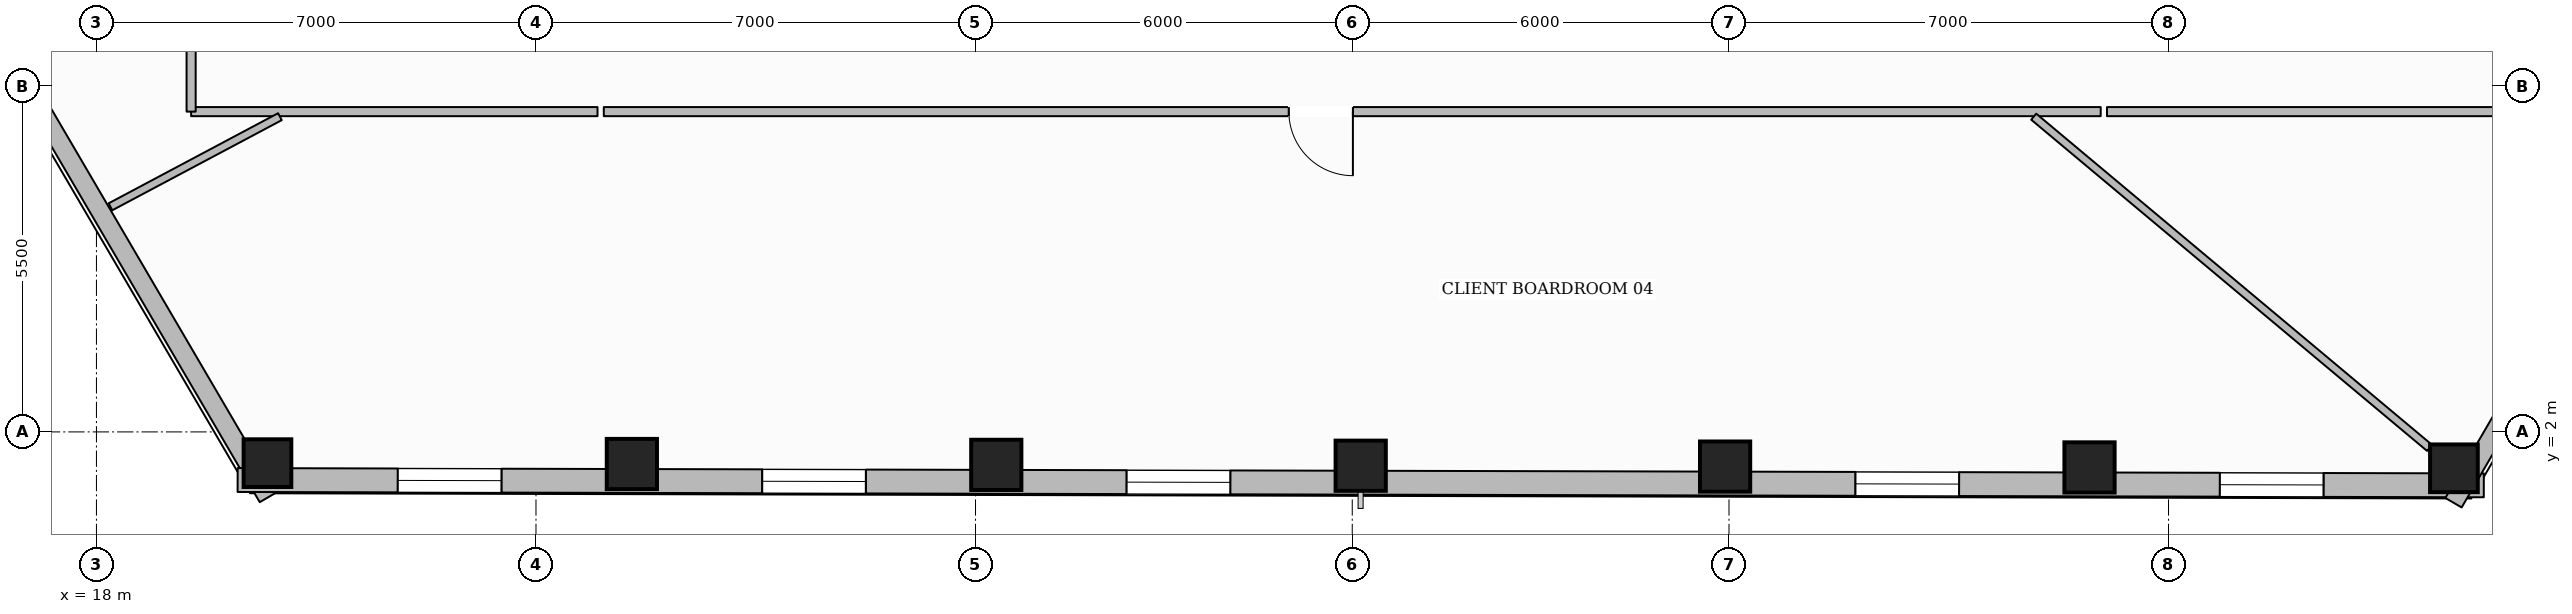
"""IFC4 building model, lengths in metres.
Left out: names, types, materials, properties, quantities, classifications, styles, units other than length and angle.
Written with IfcOpenShell. Run it as: python <this file> out.ifc"""

import sys

from ifc_helpers import new_model, si_unit, direction, frame, frame_2d, origin, origin_2d, place, context, subcontext, project, spatial, rectangle, hollow_rectangle, extrude, element, fill, save


model = new_model("IFC4")
c1 = context("Model", 3, precision=1e-05, world=origin(), true_north=direction((0.0, 1.0)))
c2 = subcontext(c1, "Body", "Model", "MODEL_VIEW")
j1 = project(units=[si_unit("LENGTHUNIT", "METRE"), si_unit("PLANEANGLEUNIT", "RADIAN")], contexts=[c1])
p1 = place(None, origin())
s1 = spatial("IfcSite", under=j1, at=p1, CompositionType="ELEMENT")
p2 = place(p1, origin())
s2 = spatial("IfcBuilding", under=s1, at=p2, CompositionType="ELEMENT")
p3 = place(p2, frame((0.0, 0.0, 56.05)))
s3 = spatial("IfcBuildingStorey", under=s2, at=p3, CompositionType="ELEMENT", Elevation=56.05)
p4 = place(p3, frame((20.723, 1.503, 0.0), z_axis=(0.0, 0.0, 1.0), x_axis=(1.0, 0.0, 0.0)))
e1 = element("IfcColumn", 1, at=p4, inside=s3, PredefinedType="COLUMN", context=c2, shape_type="SweptSolid", body=[
    extrude(hollow_rectangle(XDim=0.76, YDim=0.76, WallThickness=0.035, at=origin_2d()), origin(), (0.0, 0.0, 1.0), 3.59),
])
for number, where, z_axis, x_axis in (
    (2, (26.527, 1.489, 0.0), (0.0, 0.0, 1.0), (1.0, 0.0, 0.0)),
    (3, (32.331, 1.475, 0.0), (0.0, 0.0, 1.0), (1.0, 0.0, 0.0)),
    (4, (38.135, 1.461, 0.0), (0.0, 0.0, 1.0), (1.0, 0.0, 0.0)),
    (5, (43.938, 1.448, 0.0), (0.0, 0.0, 1.0), (1.0, 0.0, 0.0)),
    (6, (49.742, 1.434, 0.0), (0.0, 0.0, 1.0), (1.0, 0.0, 0.0)),
):
    element("IfcColumn", number, at=place(p3, frame(where, z_axis=z_axis, x_axis=x_axis)), inside=s3, PredefinedType="COLUMN", context=c2, shape_type="SweptSolid", body=[
        extrude(hollow_rectangle(XDim=0.8, YDim=0.8, WallThickness=0.036, at=origin_2d()), origin(), (0.0, 0.0, 1.0), 3.59),
    ])
p5 = place(p3, frame((55.545, 1.42, 0.0), z_axis=(0.0, 0.0, 1.0), x_axis=(1.0, 0.0, 0.0)))
e7 = element("IfcColumn", 7, at=p5, inside=s3, PredefinedType="COLUMN", context=c2, shape_type="SweptSolid", body=[
    extrude(hollow_rectangle(XDim=0.76, YDim=0.76, WallThickness=0.035, at=origin_2d()), origin(), (0.0, 0.0, 1.0), 3.59),
])
p6 = place(p3, frame((20.73, 0.957, 0.0), z_axis=(0.0, 0.0, 1.0), x_axis=(-0.5053057827, 0.86294036061, 0.0)))
e8 = element("IfcWall", 8, at=p6, inside=s3, PredefinedType="STANDARD", context=c2, shape_type="SweptSolid", body=[
    extrude(rectangle(XDim=15.556, YDim=0.3, at=frame_2d((7.778, 0.0))), origin(), (0.0, 0.0, 1.0), 2.97),
])
p7 = place(p6, frame((7.178, 0.0, 0.65)))
e9 = element("IfcOpeningElement", 9, at=p7, cuts=e8, PredefinedType="OPENING", context=c2, shape_type="SweptSolid", body=[
    extrude(rectangle(XDim=1.2, YDim=1.7, at=frame_2d((0.6, 0.85))), frame((0.0, 0.16, 0.0), z_axis=(0.0, -1.0, 0.0), x_axis=(1.0, 0.0, 0.0)), (0.0, 0.0, 1.0), 0.32),
])
p8 = place(p3, frame((56.021, 1.149, 0.0), z_axis=(0.0, 0.0, 1.0), x_axis=(-0.999997228104, 0.00235452441, 0.0)))
e10 = element("IfcWall", 10, at=p8, inside=s3, PredefinedType="STANDARD", context=c2, shape_type="SweptSolid", body=[
    extrude(rectangle(XDim=35.773, YDim=0.38, at=frame_2d((17.886, 0.0))), origin(), (0.0, 0.0, 1.0), 2.97),
])
p9 = place(p8, frame((31.572, 0.0, 0.65)))
e11 = element("IfcOpeningElement", 11, at=p9, cuts=e10, PredefinedType="OPENING", context=c2, shape_type="SweptSolid", body=[
    extrude(rectangle(XDim=1.65, YDim=1.75, at=frame_2d((0.825, 0.875))), frame((0.0, 0.2, 0.0), z_axis=(0.0, -1.0, 0.0), x_axis=(1.0, 0.0, 0.0)), (0.0, 0.0, 1.0), 0.4),
])
p10 = place(p8, frame((25.768, 0.0, 0.65)))
e12 = element("IfcOpeningElement", 12, at=p10, cuts=e10, PredefinedType="OPENING", context=c2, shape_type="SweptSolid", body=[
    extrude(rectangle(XDim=1.65, YDim=1.75, at=frame_2d((0.825, 0.875))), frame((0.0, 0.2, 0.0), z_axis=(0.0, -1.0, 0.0), x_axis=(1.0, 0.0, 0.0)), (0.0, 0.0, 1.0), 0.4),
])
p11 = place(p8, frame((19.964, 0.0, 0.65)))
e13 = element("IfcOpeningElement", 13, at=p11, cuts=e10, PredefinedType="OPENING", context=c2, shape_type="SweptSolid", body=[
    extrude(rectangle(XDim=1.65, YDim=1.75, at=frame_2d((0.825, 0.875))), frame((0.0, 0.2, 0.0), z_axis=(0.0, -1.0, 0.0), x_axis=(1.0, 0.0, 0.0)), (0.0, 0.0, 1.0), 0.4),
])
p12 = place(p8, frame((8.357, 0.0, 0.65)))
e14 = element("IfcOpeningElement", 14, at=p12, cuts=e10, PredefinedType="OPENING", context=c2, shape_type="SweptSolid", body=[
    extrude(rectangle(XDim=1.65, YDim=1.75, at=frame_2d((0.825, 0.875))), frame((0.0, 0.2, 0.0), z_axis=(0.0, -1.0, 0.0), x_axis=(1.0, 0.0, 0.0)), (0.0, 0.0, 1.0), 0.4),
])
p13 = place(p8, frame((2.553, 0.0, 0.65)))
e15 = element("IfcOpeningElement", 15, at=p13, cuts=e10, PredefinedType="OPENING", context=c2, shape_type="SweptSolid", body=[
    extrude(rectangle(XDim=1.65, YDim=1.75, at=frame_2d((0.825, 0.875))), frame((0.0, 0.2, 0.0), z_axis=(0.0, -1.0, 0.0), x_axis=(1.0, 0.0, 0.0)), (0.0, 0.0, 1.0), 0.4),
])
p14 = place(p3, frame((63.336, 14.261, 0.0), z_axis=(0.0, 0.0, 1.0), x_axis=(-0.503273250813, -0.864127325697, 0.0)))
e16 = element("IfcWall", 16, at=p14, inside=s3, PredefinedType="STANDARD", context=c2, shape_type="SweptSolid", body=[
    extrude(rectangle(XDim=15.493, YDim=0.3, at=frame_2d((7.747, 0.0))), origin(), (0.0, 0.0, 1.0), 2.97),
])
p15 = place(p14, frame((7.147, 0.0, 0.65)))
e17 = element("IfcOpeningElement", 17, at=p15, cuts=e16, PredefinedType="OPENING", context=c2, shape_type="SweptSolid", body=[
    extrude(rectangle(XDim=1.2, YDim=1.7, at=frame_2d((0.6, 0.85))), frame((0.0, 0.16, 0.0), z_axis=(0.0, -1.0, 0.0), x_axis=(1.0, 0.0, 0.0)), (0.0, 0.0, 1.0), 0.32),
])
p16 = place(p3, frame((56.789, 7.1, 0.0), z_axis=(0.0, 0.0, 1.0), x_axis=(-1.0, 0.0, 0.0)))
e18 = element("IfcWall", 18, at=p16, inside=s3, PredefinedType="PARTITIONING", context=c2, shape_type="SweptSolid", body=[
    extrude(rectangle(XDim=6.769, YDim=0.145, at=frame_2d((3.385, 0.0))), origin(), (0.0, 0.0, 1.0), 3.59),
])
p17 = place(p3, frame((49.92, 7.1, 0.0), z_axis=(0.0, 0.0, 1.0), x_axis=(-1.0, 0.0, 0.0)))
e19 = element("IfcWall", 19, at=p17, inside=s3, PredefinedType="PARTITIONING", context=c2, shape_type="SweptSolid", body=[
    extrude(rectangle(XDim=23.84, YDim=0.145, at=frame_2d((11.92, 0.0))), origin(), (0.0, 0.0, 1.0), 3.278),
])
p18 = place(p17, frame((11.91, 0.0, 0.0)))
e20 = element("IfcOpeningElement", 20, at=p18, cuts=e19, PredefinedType="OPENING", context=c2, shape_type="SweptSolid", body=[
    extrude(rectangle(XDim=1.02, YDim=2.15, at=frame_2d((0.51, 1.075))), frame((0.0, 0.083, 0.0), z_axis=(0.0, -1.0, 0.0), x_axis=(1.0, 0.0, 0.0)), (0.0, 0.0, 1.0), 0.165),
])
p19 = place(p3, frame((25.98, 7.1, 0.0), z_axis=(0.0, 0.0, 1.0), x_axis=(-1.0, 0.0, 0.0)))
e21 = element("IfcWall", 21, at=p19, inside=s3, PredefinedType="PARTITIONING", context=c2, shape_type="SweptSolid", body=[
    extrude(rectangle(XDim=6.472, YDim=0.145, at=frame_2d((3.236, 0.0))), origin(), (0.0, 0.0, 1.0), 3.59),
])
p20 = place(p3, frame((19.508, 7.1, 0.0), z_axis=(0.0, 0.0, 1.0), x_axis=(0.0, 1.0, 0.0)))
e22 = element("IfcWall", 22, at=p20, inside=s3, PredefinedType="PARTITIONING", context=c2, shape_type="SweptSolid", body=[
    extrude(rectangle(XDim=2.0, YDim=0.145, at=frame_2d((1.0, 0.0))), origin(), (0.0, 0.0, 1.0), 3.59),
])
p21 = place(p3, frame((20.922, 7.02, 0.0), z_axis=(0.0, 0.0, 1.0), x_axis=(-0.882949174281, -0.469468588551, 0.0)))
e23 = element("IfcWall", 23, at=p21, inside=s3, PredefinedType="PARTITIONING", context=c2, shape_type="SweptSolid", body=[
    extrude(rectangle(XDim=3.057, YDim=0.125, at=frame_2d((1.528, 0.0))), origin(), (0.0, 0.0, 1.0), 3.59),
])
p22 = place(p3, frame((48.853, 7.02, 0.0), z_axis=(0.0, 0.0, 1.0), x_axis=(0.766968427063, -0.641684838443, 0.0)))
e24 = element("IfcWall", 24, at=p22, inside=s3, PredefinedType="PARTITIONING", context=c2, shape_type="SweptSolid", body=[
    extrude(rectangle(XDim=8.22, YDim=0.125, at=frame_2d((4.11, 0.0))), origin(), (0.0, 0.0, 1.0), 3.057),
])
p23 = place(p9, origin())
e25 = element("IfcWindow", 25, at=p23, inside=s3, PartitioningType="SINGLE_PANEL", PredefinedType="WINDOW", context=c2, shape_type="SweptSolid", body=[
    extrude(rectangle(XDim=1.65, YDim=1.75, at=frame_2d((0.825, 0.875))), frame((0.0, 0.03, 0.0), z_axis=(0.0, -1.0, 0.0), x_axis=(1.0, 0.0, 0.0)), (0.0, 0.0, 1.0), 0.06),
])
fill(e11, e25)
p24 = place(p10, origin())
e26 = element("IfcWindow", 26, at=p24, inside=s3, PartitioningType="SINGLE_PANEL", PredefinedType="WINDOW", context=c2, shape_type="SweptSolid", body=[
    extrude(rectangle(XDim=1.65, YDim=1.75, at=frame_2d((0.825, 0.875))), frame((0.0, 0.03, 0.0), z_axis=(0.0, -1.0, 0.0), x_axis=(1.0, 0.0, 0.0)), (0.0, 0.0, 1.0), 0.06),
])
fill(e12, e26)
p25 = place(p11, origin())
e27 = element("IfcWindow", 27, at=p25, inside=s3, PartitioningType="SINGLE_PANEL", PredefinedType="WINDOW", context=c2, shape_type="SweptSolid", body=[
    extrude(rectangle(XDim=1.65, YDim=1.75, at=frame_2d((0.825, 0.875))), frame((0.0, 0.03, 0.0), z_axis=(0.0, -1.0, 0.0), x_axis=(1.0, 0.0, 0.0)), (0.0, 0.0, 1.0), 0.06),
])
fill(e13, e27)
p26 = place(p12, origin())
e28 = element("IfcWindow", 28, at=p26, inside=s3, PartitioningType="SINGLE_PANEL", PredefinedType="WINDOW", context=c2, shape_type="SweptSolid", body=[
    extrude(rectangle(XDim=1.65, YDim=1.75, at=frame_2d((0.825, 0.875))), frame((0.0, 0.03, 0.0), z_axis=(0.0, -1.0, 0.0), x_axis=(1.0, 0.0, 0.0)), (0.0, 0.0, 1.0), 0.06),
])
fill(e14, e28)
p27 = place(p13, origin())
e29 = element("IfcWindow", 29, at=p27, inside=s3, PartitioningType="SINGLE_PANEL", PredefinedType="WINDOW", context=c2, shape_type="SweptSolid", body=[
    extrude(rectangle(XDim=1.65, YDim=1.75, at=frame_2d((0.825, 0.875))), frame((0.0, 0.03, 0.0), z_axis=(0.0, -1.0, 0.0), x_axis=(1.0, 0.0, 0.0)), (0.0, 0.0, 1.0), 0.06),
])
fill(e15, e29)
p28 = place(p18, origin())
e30 = element("IfcDoor", 30, at=p28, inside=s3, OperationType="SINGLE_SWING_LEFT", PredefinedType="DOOR", context=c2, shape_type="SweptSolid", body=[
    extrude(rectangle(XDim=1.02, YDim=2.15, at=frame_2d((0.51, 1.075))), frame((0.0, 0.025, 0.0), z_axis=(0.0, -1.0, 0.0), x_axis=(1.0, 0.0, 0.0)), (0.0, 0.0, 1.0), 0.05),
])
fill(e20, e30)
save(model, sys.argv[1])
